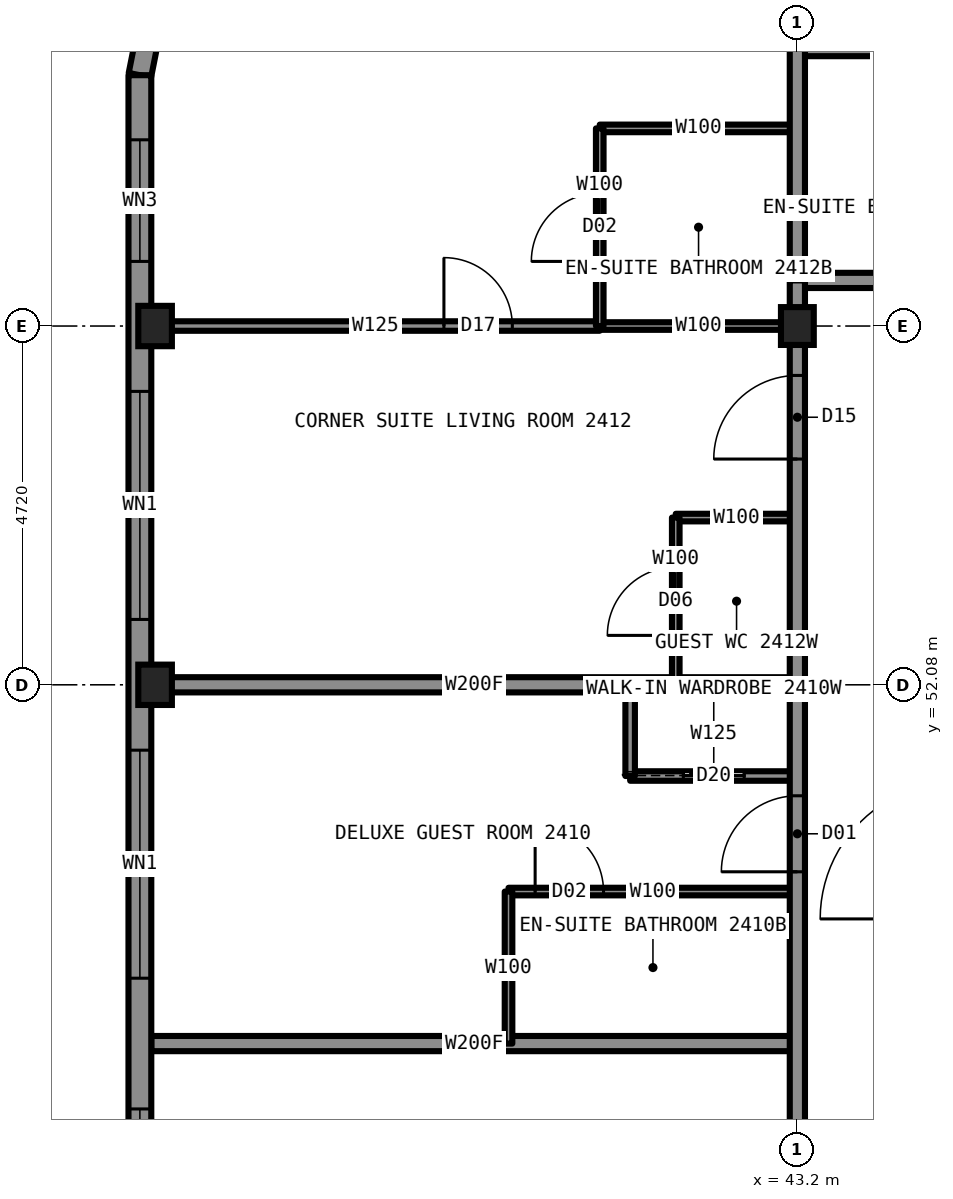
"""IFC4 building model, lengths in metres.
Left out: names, types, materials, properties, quantities, classifications, styles, units other than length and angle.
Written with IfcOpenShell. Run it as: python <this file> out.ifc"""

import sys

from ifc_helpers import new_model, si_unit, direction, frame, frame_2d, origin, origin_2d, place, context, subcontext, project, spatial, rectangle, i_section, extrude, element, fill, save


model = new_model("IFC4")
c1 = context("Model", 3, precision=1e-05, world=origin(), true_north=direction((0.0, 1.0)))
c2 = subcontext(c1, "Body", "Model", "MODEL_VIEW")
j1 = project(units=[si_unit("LENGTHUNIT", "METRE"), si_unit("PLANEANGLEUNIT", "RADIAN")], contexts=[c1])
p1 = place(None, origin())
s1 = spatial("IfcSite", under=j1, at=p1, CompositionType="ELEMENT")
p2 = place(p1, origin())
s2 = spatial("IfcBuilding", under=s1, at=p2, CompositionType="ELEMENT")
p3 = place(p2, frame((0.0, 0.0, 93.4)))
s3 = spatial("IfcBuildingStorey", under=s2, at=p3, CompositionType="ELEMENT", Elevation=93.4)
for number, where, z_axis, x_axis in (
    (1, (34.75, 52.08, 0.0), (0.0, 0.0, 1.0), (1.0, 0.0, 0.0)),
    (2, (34.75, 56.8, 0.0), (0.0, 0.0, 1.0), (1.0, 0.0, 0.0)),
):
    element("IfcColumn", number, at=place(p3, frame(where, z_axis=z_axis, x_axis=x_axis)), inside=s3, PredefinedType="COLUMN", context=c2, shape_type="SweptSolid", body=[
        extrude(i_section(OverallWidth=0.442, OverallDepth=0.531, WebThickness=0.066, FlangeThickness=0.106, at=origin_2d()), origin(), (0.0, 0.0, 1.0), 3.5),
    ])
p4 = place(p3, frame((43.2, 56.8, 0.0), z_axis=(0.0, 0.0, 1.0), x_axis=(1.0, 0.0, 0.0)))
e3 = element("IfcColumn", 3, at=p4, inside=s3, PredefinedType="COLUMN", context=c2, shape_type="SweptSolid", body=[
    extrude(i_section(OverallWidth=0.432, OverallDepth=0.498, WebThickness=0.056, FlangeThickness=0.089, at=origin_2d()), origin(), (0.0, 0.0, 1.0), 3.5),
])
p5 = place(p3, frame((40.6, 56.8, 0.0), z_axis=(0.0, 0.0, 1.0), x_axis=(1.0, 0.0, 0.0)))
e4 = element("IfcWall", 4, at=p5, inside=s3, PredefinedType="PARTITIONING", context=c2, shape_type="SweptSolid", body=[
    extrude(rectangle(XDim=2.6, YDim=0.1, at=frame_2d((1.3, 0.0))), origin(), (0.0, 0.0, 1.0), 2.573),
])
p6 = place(p3, frame((34.7, 56.8, 0.0), z_axis=(0.0, 0.0, 1.0), x_axis=(1.0, 0.0, 0.0)))
e5 = element("IfcWall", 5, at=p6, inside=s3, PredefinedType="PARTITIONING", context=c2, shape_type="SweptSolid", body=[
    extrude(rectangle(XDim=5.9, YDim=0.125, at=frame_2d((2.95, 0.0))), origin(), (0.0, 0.0, 1.0), 2.573),
])
p7 = place(p6, frame((3.85, 0.0, 0.0)))
e6 = element("IfcOpeningElement", 6, at=p7, cuts=e5, PredefinedType="OPENING", context=c2, shape_type="SweptSolid", body=[
    extrude(rectangle(XDim=0.9, YDim=2.2, at=frame_2d((0.45, 1.1))), frame((0.0, 0.073, 0.0), z_axis=(0.0, -1.0, 0.0), x_axis=(1.0, 0.0, 0.0)), (0.0, 0.0, 1.0), 0.145),
])
p8 = place(p3, frame((43.2, 57.4, 0.0), z_axis=(0.0, 0.0, 1.0), x_axis=(1.0, 0.0, 0.0)))
e7 = element("IfcWall", 7, at=p8, inside=s3, PredefinedType="PARTITIONING", context=c2, shape_type="SweptSolid", body=[
    extrude(rectangle(XDim=23.6, YDim=0.2, at=frame_2d((11.8, 0.0))), origin(), (0.0, 0.0, 1.0), 3.33),
])
p9 = place(p8, frame((3.0, 0.0, 0.0)))
e8 = element("IfcOpeningElement", 8, at=p9, cuts=e7, PredefinedType="OPENING", context=c2, shape_type="SweptSolid", body=[
    extrude(rectangle(XDim=1.0, YDim=2.2, at=frame_2d((0.5, 1.1))), frame((0.0, 0.11, 0.0), z_axis=(0.0, -1.0, 0.0), x_axis=(1.0, 0.0, 0.0)), (0.0, 0.0, 1.0), 0.22),
])
p10 = place(p8, frame((9.84, 0.0, 0.0)))
e9 = element("IfcOpeningElement", 9, at=p10, cuts=e7, PredefinedType="OPENING", context=c2, shape_type="SweptSolid", body=[
    extrude(rectangle(XDim=1.0, YDim=2.2, at=frame_2d((0.5, 1.1))), frame((0.0, 0.11, 0.0), z_axis=(0.0, -1.0, 0.0), x_axis=(1.0, 0.0, 0.0)), (0.0, 0.0, 1.0), 0.22),
])
p11 = place(p8, frame((16.71, 0.0, 0.0)))
e10 = element("IfcOpeningElement", 10, at=p11, cuts=e7, PredefinedType="OPENING", context=c2, shape_type="SweptSolid", body=[
    extrude(rectangle(XDim=1.0, YDim=2.2, at=frame_2d((0.5, 1.1))), frame((0.0, 0.11, 0.0), z_axis=(0.0, -1.0, 0.0), x_axis=(1.0, 0.0, 0.0)), (0.0, 0.0, 1.0), 0.22),
])
p12 = place(p8, frame((19.28, 0.0, 0.0)))
e11 = element("IfcOpeningElement", 11, at=p12, cuts=e7, PredefinedType="OPENING", context=c2, shape_type="SweptSolid", body=[
    extrude(rectangle(XDim=1.0, YDim=2.2, at=frame_2d((0.5, 1.1))), frame((0.0, 0.11, 0.0), z_axis=(0.0, -1.0, 0.0), x_axis=(1.0, 0.0, 0.0)), (0.0, 0.0, 1.0), 0.22),
])
p13 = place(p3, frame((40.6, 59.4, 0.0), z_axis=(0.0, 0.0, 1.0), x_axis=(1.0, 0.0, 0.0)))
e12 = element("IfcWall", 12, at=p13, inside=s3, PredefinedType="PARTITIONING", context=c2, shape_type="SweptSolid", body=[
    extrude(rectangle(XDim=2.6, YDim=0.1, at=frame_2d((1.3, 0.0))), origin(), (0.0, 0.0, 1.0), 3.33),
])
p14 = place(p3, frame((43.2, 60.4, 0.0), z_axis=(0.0, 0.0, 1.0), x_axis=(1.0, 0.0, 0.0)))
e13 = element("IfcWall", 13, at=p14, inside=s3, PredefinedType="PARTITIONING", context=c2, shape_type="SweptSolid", body=[
    extrude(rectangle(XDim=2.6, YDim=0.1, at=frame_2d((1.3, 0.0))), origin(), (0.0, 0.0, 1.0), 3.33),
])
p15 = place(p3, frame((34.7, 47.36, 0.0), z_axis=(0.0, 0.0, 1.0), x_axis=(1.0, 0.0, 0.0)))
e14 = element("IfcWall", 14, at=p15, inside=s3, PredefinedType="PARTITIONING", context=c2, shape_type="SweptSolid", body=[
    extrude(rectangle(XDim=8.5, YDim=0.2, at=frame_2d((4.25, 0.0))), origin(), (0.0, 0.0, 1.0), 2.731),
])
p16 = place(p3, frame((39.4, 49.36, 0.0), z_axis=(0.0, 0.0, 1.0), x_axis=(1.0, 0.0, 0.0)))
e15 = element("IfcWall", 15, at=p16, inside=s3, PredefinedType="PARTITIONING", context=c2, shape_type="SweptSolid", body=[
    extrude(rectangle(XDim=3.8, YDim=0.1, at=frame_2d((1.9, 0.0))), origin(), (0.0, 0.0, 1.0), 3.33),
])
p17 = place(p16, frame((0.35, 0.0, 0.0)))
e16 = element("IfcOpeningElement", 16, at=p17, cuts=e15, PredefinedType="OPENING", context=c2, shape_type="SweptSolid", body=[
    extrude(rectangle(XDim=0.9, YDim=2.1, at=frame_2d((0.45, 1.05))), frame((0.0, 0.06, 0.0), z_axis=(0.0, -1.0, 0.0), x_axis=(1.0, 0.0, 0.0)), (0.0, 0.0, 1.0), 0.12),
])
p18 = place(p3, frame((41.0, 50.88, 0.0), z_axis=(0.0, 0.0, 1.0), x_axis=(1.0, 0.0, 0.0)))
e17 = element("IfcWall", 17, at=p18, inside=s3, PredefinedType="PARTITIONING", context=c2, shape_type="SweptSolid", body=[
    extrude(rectangle(XDim=2.2, YDim=0.125, at=frame_2d((1.1, 0.0))), origin(), (0.0, 0.0, 1.0), 3.33),
])
p19 = place(p18, frame((0.7, 0.0, 0.0)))
e18 = element("IfcOpeningElement", 18, at=p19, cuts=e17, PredefinedType="OPENING", context=c2, shape_type="SweptSolid", body=[
    extrude(rectangle(XDim=0.8, YDim=2.1, at=frame_2d((0.4, 1.05))), frame((0.0, 0.073, 0.0), z_axis=(0.0, -1.0, 0.0), x_axis=(1.0, 0.0, 0.0)), (0.0, 0.0, 1.0), 0.145),
])
p20 = place(p3, frame((34.7, 52.08, 0.0), z_axis=(0.0, 0.0, 1.0), x_axis=(1.0, 0.0, 0.0)))
e19 = element("IfcWall", 19, at=p20, inside=s3, PredefinedType="PARTITIONING", context=c2, shape_type="SweptSolid", body=[
    extrude(rectangle(XDim=8.5, YDim=0.2, at=frame_2d((4.25, 0.0))), origin(), (0.0, 0.0, 1.0), 2.573),
])
p21 = place(p3, frame((41.6, 54.28, 0.0), z_axis=(0.0, 0.0, 1.0), x_axis=(1.0, 0.0, 0.0)))
e20 = element("IfcWall", 20, at=p21, inside=s3, PredefinedType="PARTITIONING", context=c2, shape_type="SweptSolid", body=[
    extrude(rectangle(XDim=1.6, YDim=0.1, at=frame_2d((0.8, 0.0))), origin(), (0.0, 0.0, 1.0), 3.33),
])
p22 = place(p3, frame((43.2, 33.22, 0.0), z_axis=(0.0, 0.0, 1.0), x_axis=(0.0, 1.0, 0.0)))
e21 = element("IfcWall", 21, at=p22, inside=s3, PredefinedType="PARTITIONING", context=c2, shape_type="SweptSolid", body=[
    extrude(rectangle(XDim=23.56, YDim=0.2, at=frame_2d((11.78, 0.0))), origin(), (0.0, 0.0, 1.0), 3.33),
])
p23 = place(p22, frame((16.4, 0.0, 0.0)))
e22 = element("IfcOpeningElement", 22, at=p23, cuts=e21, PredefinedType="OPENING", context=c2, shape_type="SweptSolid", body=[
    extrude(rectangle(XDim=1.0, YDim=2.2, at=frame_2d((0.5, 1.1))), frame((0.0, 0.11, 0.0), z_axis=(0.0, -1.0, 0.0), x_axis=(1.0, 0.0, 0.0)), (0.0, 0.0, 1.0), 0.22),
])
p24 = place(p22, frame((21.83, 0.0, 0.0)))
e23 = element("IfcOpeningElement", 23, at=p24, cuts=e21, PredefinedType="OPENING", context=c2, shape_type="SweptSolid", body=[
    extrude(rectangle(XDim=1.1, YDim=2.2, at=frame_2d((0.55, 1.1))), frame((0.0, 0.11, 0.0), z_axis=(0.0, -1.0, 0.0), x_axis=(1.0, 0.0, 0.0)), (0.0, 0.0, 1.0), 0.22),
])
p25 = place(p22, frame((0.63, 0.0, 0.0)))
e24 = element("IfcOpeningElement", 24, at=p25, cuts=e21, PredefinedType="OPENING", context=c2, shape_type="SweptSolid", body=[
    extrude(rectangle(XDim=1.1, YDim=2.2, at=frame_2d((0.55, 1.1))), frame((0.0, 0.11, 0.0), z_axis=(0.0, -1.0, 0.0), x_axis=(1.0, 0.0, 0.0)), (0.0, 0.0, 1.0), 0.22),
])
p26 = place(p22, frame((7.45, 0.0, 0.0)))
e25 = element("IfcOpeningElement", 25, at=p26, cuts=e21, PredefinedType="OPENING", context=c2, shape_type="SweptSolid", body=[
    extrude(rectangle(XDim=2.0, YDim=2.4, at=frame_2d((1.0, 1.2))), frame((0.0, 0.11, 0.0), z_axis=(0.0, -1.0, 0.0), x_axis=(1.0, 0.0, 0.0)), (0.0, 0.0, 1.0), 0.22),
])
p27 = place(p22, frame((5.4, 0.0, 0.0)))
e26 = element("IfcOpeningElement", 26, at=p27, cuts=e21, PredefinedType="OPENING", context=c2, shape_type="SweptSolid", body=[
    extrude(rectangle(XDim=1.0, YDim=2.1, at=frame_2d((0.5, 1.05))), frame((0.0, 0.11, 0.0), z_axis=(0.0, -1.0, 0.0), x_axis=(1.0, 0.0, 0.0)), (0.0, 0.0, 1.0), 0.22),
])
p28 = place(p3, frame((43.2, 57.4, 0.0), z_axis=(0.0, 0.0, 1.0), x_axis=(0.0, 1.0, 0.0)))
e27 = element("IfcWall", 27, at=p28, inside=s3, PredefinedType="PARTITIONING", context=c2, shape_type="SweptSolid", body=[
    extrude(rectangle(XDim=7.9, YDim=0.2, at=frame_2d((3.95, 0.0))), origin(), (0.0, 0.0, 1.0), 2.573),
])
p29 = place(p3, frame((41.6, 52.08, 0.0), z_axis=(0.0, 0.0, 1.0), x_axis=(0.0, 1.0, 0.0)))
e28 = element("IfcWall", 28, at=p29, inside=s3, PredefinedType="PARTITIONING", context=c2, shape_type="SweptSolid", body=[
    extrude(rectangle(XDim=2.2, YDim=0.1, at=frame_2d((1.1, 0.0))), origin(), (0.0, 0.0, 1.0), 3.33),
])
p30 = place(p29, frame((0.65, 0.0, 0.0)))
e29 = element("IfcOpeningElement", 29, at=p30, cuts=e28, PredefinedType="OPENING", context=c2, shape_type="SweptSolid", body=[
    extrude(rectangle(XDim=0.9, YDim=2.1, at=frame_2d((0.45, 1.05))), frame((0.0, 0.06, 0.0), z_axis=(0.0, -1.0, 0.0), x_axis=(1.0, 0.0, 0.0)), (0.0, 0.0, 1.0), 0.12),
])
p31 = place(p3, frame((41.0, 50.88, 0.0), z_axis=(0.0, 0.0, 1.0), x_axis=(0.0, 1.0, 0.0)))
e30 = element("IfcWall", 30, at=p31, inside=s3, PredefinedType="PARTITIONING", context=c2, shape_type="SweptSolid", body=[
    extrude(rectangle(XDim=1.2, YDim=0.125, at=frame_2d((0.6, 0.0))), origin(), (0.0, 0.0, 1.0), 3.33),
])
p32 = place(p3, frame((40.6, 56.8, 0.0), z_axis=(0.0, 0.0, 1.0), x_axis=(0.0, 1.0, 0.0)))
e31 = element("IfcWall", 31, at=p32, inside=s3, PredefinedType="PARTITIONING", context=c2, shape_type="SweptSolid", body=[
    extrude(rectangle(XDim=2.6, YDim=0.1, at=frame_2d((1.3, 0.0))), origin(), (0.0, 0.0, 1.0), 3.33),
])
p33 = place(p32, frame((0.85, 0.0, 0.0)))
e32 = element("IfcOpeningElement", 32, at=p33, cuts=e31, PredefinedType="OPENING", context=c2, shape_type="SweptSolid", body=[
    extrude(rectangle(XDim=0.9, YDim=2.1, at=frame_2d((0.45, 1.05))), frame((0.0, 0.06, 0.0), z_axis=(0.0, -1.0, 0.0), x_axis=(1.0, 0.0, 0.0)), (0.0, 0.0, 1.0), 0.12),
])
p34 = place(p3, frame((39.4, 47.36, 0.0), z_axis=(0.0, 0.0, 1.0), x_axis=(0.0, 1.0, 0.0)))
e33 = element("IfcWall", 33, at=p34, inside=s3, PredefinedType="PARTITIONING", context=c2, shape_type="SweptSolid", body=[
    extrude(rectangle(XDim=2.0, YDim=0.1, at=frame_2d((1.0, 0.0))), origin(), (0.0, 0.0, 1.0), 3.33),
])
p35 = place(p3, frame((34.957, 62.147, 0.0), z_axis=(0.0, 0.0, 1.0), x_axis=(-0.195081421501, -0.980787050784, 0.0)))
e34 = element("IfcWall", 34, at=p35, inside=s3, PredefinedType="SOLIDWALL", context=c2, shape_type="SweptSolid", body=[
    extrude(rectangle(XDim=2.087, YDim=0.3, at=frame_2d((1.044, 0.0))), origin(), (0.0, 0.0, 1.0), 3.33),
])
p36 = place(p35, frame((0.444, 0.0, 0.5)))
e35 = element("IfcOpeningElement", 35, at=p36, cuts=e34, PredefinedType="OPENING", context=c2, shape_type="SweptSolid", body=[
    extrude(rectangle(XDim=1.2, YDim=2.0, at=frame_2d((0.6, 1.0))), frame((0.0, 0.16, 0.0), z_axis=(0.0, -1.0, 0.0), x_axis=(1.0, 0.0, 0.0)), (0.0, 0.0, 1.0), 0.32),
])
p37 = place(p3, frame((34.55, 60.1, 0.0), z_axis=(0.0, 0.0, 1.0), x_axis=(0.0, -1.0, 0.0)))
e36 = element("IfcWall", 36, at=p37, inside=s3, PredefinedType="SOLIDWALL", context=c2, shape_type="SweptSolid", body=[
    extrude(rectangle(XDim=30.2, YDim=0.3, at=frame_2d((15.1, 0.0))), origin(), (0.0, 0.0, 1.0), 2.83),
])
p38 = place(p37, frame((0.85, 0.0, 0.5)))
e37 = element("IfcOpeningElement", 37, at=p38, cuts=e36, PredefinedType="OPENING", context=c2, shape_type="SweptSolid", body=[
    extrude(rectangle(XDim=1.6, YDim=2.0, at=frame_2d((0.8, 1.0))), frame((0.0, 0.16, 0.0), z_axis=(0.0, -1.0, 0.0), x_axis=(1.0, 0.0, 0.0)), (0.0, 0.0, 1.0), 0.32),
])
p39 = place(p37, frame((4.16, 0.0, 0.5)))
e38 = element("IfcOpeningElement", 38, at=p39, cuts=e36, PredefinedType="OPENING", context=c2, shape_type="SweptSolid", body=[
    extrude(rectangle(XDim=3.0, YDim=2.0, at=frame_2d((1.5, 1.0))), frame((0.0, 0.16, 0.0), z_axis=(0.0, -1.0, 0.0), x_axis=(1.0, 0.0, 0.0)), (0.0, 0.0, 1.0), 0.32),
])
p40 = place(p37, frame((8.88, 0.0, 0.5)))
e39 = element("IfcOpeningElement", 39, at=p40, cuts=e36, PredefinedType="OPENING", context=c2, shape_type="SweptSolid", body=[
    extrude(rectangle(XDim=3.0, YDim=2.0, at=frame_2d((1.5, 1.0))), frame((0.0, 0.16, 0.0), z_axis=(0.0, -1.0, 0.0), x_axis=(1.0, 0.0, 0.0)), (0.0, 0.0, 1.0), 0.32),
])
p41 = place(p37, frame((13.6, 0.0, 0.5)))
e40 = element("IfcOpeningElement", 40, at=p41, cuts=e36, PredefinedType="OPENING", context=c2, shape_type="SweptSolid", body=[
    extrude(rectangle(XDim=3.0, YDim=2.0, at=frame_2d((1.5, 1.0))), frame((0.0, 0.16, 0.0), z_axis=(0.0, -1.0, 0.0), x_axis=(1.0, 0.0, 0.0)), (0.0, 0.0, 1.0), 0.32),
])
p42 = place(p37, frame((18.32, 0.0, 0.5)))
e41 = element("IfcOpeningElement", 41, at=p42, cuts=e36, PredefinedType="OPENING", context=c2, shape_type="SweptSolid", body=[
    extrude(rectangle(XDim=3.0, YDim=2.0, at=frame_2d((1.5, 1.0))), frame((0.0, 0.16, 0.0), z_axis=(0.0, -1.0, 0.0), x_axis=(1.0, 0.0, 0.0)), (0.0, 0.0, 1.0), 0.32),
])
p43 = place(p37, frame((23.04, 0.0, 0.5)))
e42 = element("IfcOpeningElement", 42, at=p43, cuts=e36, PredefinedType="OPENING", context=c2, shape_type="SweptSolid", body=[
    extrude(rectangle(XDim=3.0, YDim=2.0, at=frame_2d((1.5, 1.0))), frame((0.0, 0.16, 0.0), z_axis=(0.0, -1.0, 0.0), x_axis=(1.0, 0.0, 0.0)), (0.0, 0.0, 1.0), 0.32),
])
p44 = place(p37, frame((27.75, 0.0, 0.5)))
e43 = element("IfcOpeningElement", 43, at=p44, cuts=e36, PredefinedType="OPENING", context=c2, shape_type="SweptSolid", body=[
    extrude(rectangle(XDim=1.6, YDim=2.0, at=frame_2d((0.8, 1.0))), frame((0.0, 0.16, 0.0), z_axis=(0.0, -1.0, 0.0), x_axis=(1.0, 0.0, 0.0)), (0.0, 0.0, 1.0), 0.32),
])
p45 = place(p3, frame((43.2, 56.78, 0.0), z_axis=(0.0, 0.0, 1.0), x_axis=(0.0, 1.0, 0.0)))
e44 = element("IfcWall", 44, at=p45, inside=s3, PredefinedType="PARTITIONING", context=c2, shape_type="SweptSolid", body=[
    extrude(rectangle(XDim=0.62, YDim=0.2, at=frame_2d((0.31, 0.0))), origin(), (0.0, 0.0, 1.0), 2.573),
])
p46 = place(p23, origin())
e45 = element("IfcDoor", 45, at=p46, inside=s3, OperationType="SINGLE_SWING_LEFT", PredefinedType="DOOR", context=c2, shape_type="SweptSolid", body=[
    extrude(rectangle(XDim=1.0, YDim=2.2, at=frame_2d((0.5, 1.1))), frame((0.0, 0.025, 0.0), z_axis=(0.0, -1.0, 0.0), x_axis=(1.0, 0.0, 0.0)), (0.0, 0.0, 1.0), 0.05),
])
fill(e22, e45)
p47 = place(p17, origin())
e46 = element("IfcDoor", 46, at=p47, inside=s3, OperationType="SINGLE_SWING_RIGHT", PredefinedType="DOOR", context=c2, shape_type="SweptSolid", body=[
    extrude(rectangle(XDim=0.9, YDim=2.1, at=frame_2d((0.45, 1.05))), frame((0.0, 0.025, 0.0), z_axis=(0.0, -1.0, 0.0), x_axis=(1.0, 0.0, 0.0)), (0.0, 0.0, 1.0), 0.05),
])
fill(e16, e46)
p48 = place(p19, origin())
e47 = element("IfcDoor", 47, at=p48, inside=s3, OperationType="SLIDING_TO_LEFT", PredefinedType="DOOR", context=c2, shape_type="SweptSolid", body=[
    extrude(rectangle(XDim=0.8, YDim=2.1, at=frame_2d((0.4, 1.05))), frame((0.0, 0.025, 0.0), z_axis=(0.0, -1.0, 0.0), x_axis=(1.0, 0.0, 0.0)), (0.0, 0.0, 1.0), 0.05),
])
fill(e18, e47)
p49 = place(p24, origin())
e48 = element("IfcDoor", 48, at=p49, inside=s3, OperationType="SINGLE_SWING_LEFT", PredefinedType="DOOR", context=c2, shape_type="SweptSolid", body=[
    extrude(rectangle(XDim=1.1, YDim=2.2, at=frame_2d((0.55, 1.1))), frame((0.0, 0.025, 0.0), z_axis=(0.0, -1.0, 0.0), x_axis=(1.0, 0.0, 0.0)), (0.0, 0.0, 1.0), 0.05),
])
fill(e23, e48)
p50 = place(p33, origin())
e49 = element("IfcDoor", 49, at=p50, inside=s3, OperationType="SINGLE_SWING_RIGHT", PredefinedType="DOOR", context=c2, shape_type="SweptSolid", body=[
    extrude(rectangle(XDim=0.9, YDim=2.1, at=frame_2d((0.45, 1.05))), frame((0.0, 0.025, 0.0), z_axis=(0.0, -1.0, 0.0), x_axis=(1.0, 0.0, 0.0)), (0.0, 0.0, 1.0), 0.05),
])
fill(e32, e49)
p51 = place(p7, origin())
e50 = element("IfcDoor", 50, at=p51, inside=s3, OperationType="SINGLE_SWING_LEFT", PredefinedType="DOOR", context=c2, shape_type="SweptSolid", body=[
    extrude(rectangle(XDim=0.9, YDim=2.2, at=frame_2d((0.45, 1.1))), frame((0.0, 0.025, 0.0), z_axis=(0.0, -1.0, 0.0), x_axis=(1.0, 0.0, 0.0)), (0.0, 0.0, 1.0), 0.05),
])
fill(e6, e50)
p52 = place(p30, origin())
e51 = element("IfcDoor", 51, at=p52, inside=s3, OperationType="SINGLE_SWING_LEFT", PredefinedType="DOOR", context=c2, shape_type="SweptSolid", body=[
    extrude(rectangle(XDim=0.9, YDim=2.1, at=frame_2d((0.45, 1.05))), frame((0.0, 0.025, 0.0), z_axis=(0.0, -1.0, 0.0), x_axis=(1.0, 0.0, 0.0)), (0.0, 0.0, 1.0), 0.05),
])
fill(e29, e51)
p53 = place(p38, origin())
e52 = element("IfcWindow", 52, at=p53, inside=s3, PartitioningType="SINGLE_PANEL", PredefinedType="WINDOW", context=c2, shape_type="SweptSolid", body=[
    extrude(rectangle(XDim=1.6, YDim=2.0, at=frame_2d((0.8, 1.0))), frame((0.0, 0.03, 0.0), z_axis=(0.0, -1.0, 0.0), x_axis=(1.0, 0.0, 0.0)), (0.0, 0.0, 1.0), 0.06),
])
fill(e37, e52)
p54 = place(p39, origin())
e53 = element("IfcWindow", 53, at=p54, inside=s3, PartitioningType="SINGLE_PANEL", PredefinedType="WINDOW", context=c2, shape_type="SweptSolid", body=[
    extrude(rectangle(XDim=3.0, YDim=2.0, at=frame_2d((1.5, 1.0))), frame((0.0, 0.03, 0.0), z_axis=(0.0, -1.0, 0.0), x_axis=(1.0, 0.0, 0.0)), (0.0, 0.0, 1.0), 0.06),
])
fill(e38, e53)
p55 = place(p40, origin())
e54 = element("IfcWindow", 54, at=p55, inside=s3, PartitioningType="SINGLE_PANEL", PredefinedType="WINDOW", context=c2, shape_type="SweptSolid", body=[
    extrude(rectangle(XDim=3.0, YDim=2.0, at=frame_2d((1.5, 1.0))), frame((0.0, 0.03, 0.0), z_axis=(0.0, -1.0, 0.0), x_axis=(1.0, 0.0, 0.0)), (0.0, 0.0, 1.0), 0.06),
])
fill(e39, e54)
p56 = place(p41, origin())
e55 = element("IfcWindow", 55, at=p56, inside=s3, PartitioningType="SINGLE_PANEL", PredefinedType="WINDOW", context=c2, shape_type="SweptSolid", body=[
    extrude(rectangle(XDim=3.0, YDim=2.0, at=frame_2d((1.5, 1.0))), frame((0.0, 0.03, 0.0), z_axis=(0.0, -1.0, 0.0), x_axis=(1.0, 0.0, 0.0)), (0.0, 0.0, 1.0), 0.06),
])
fill(e40, e55)
save(model, sys.argv[1])
